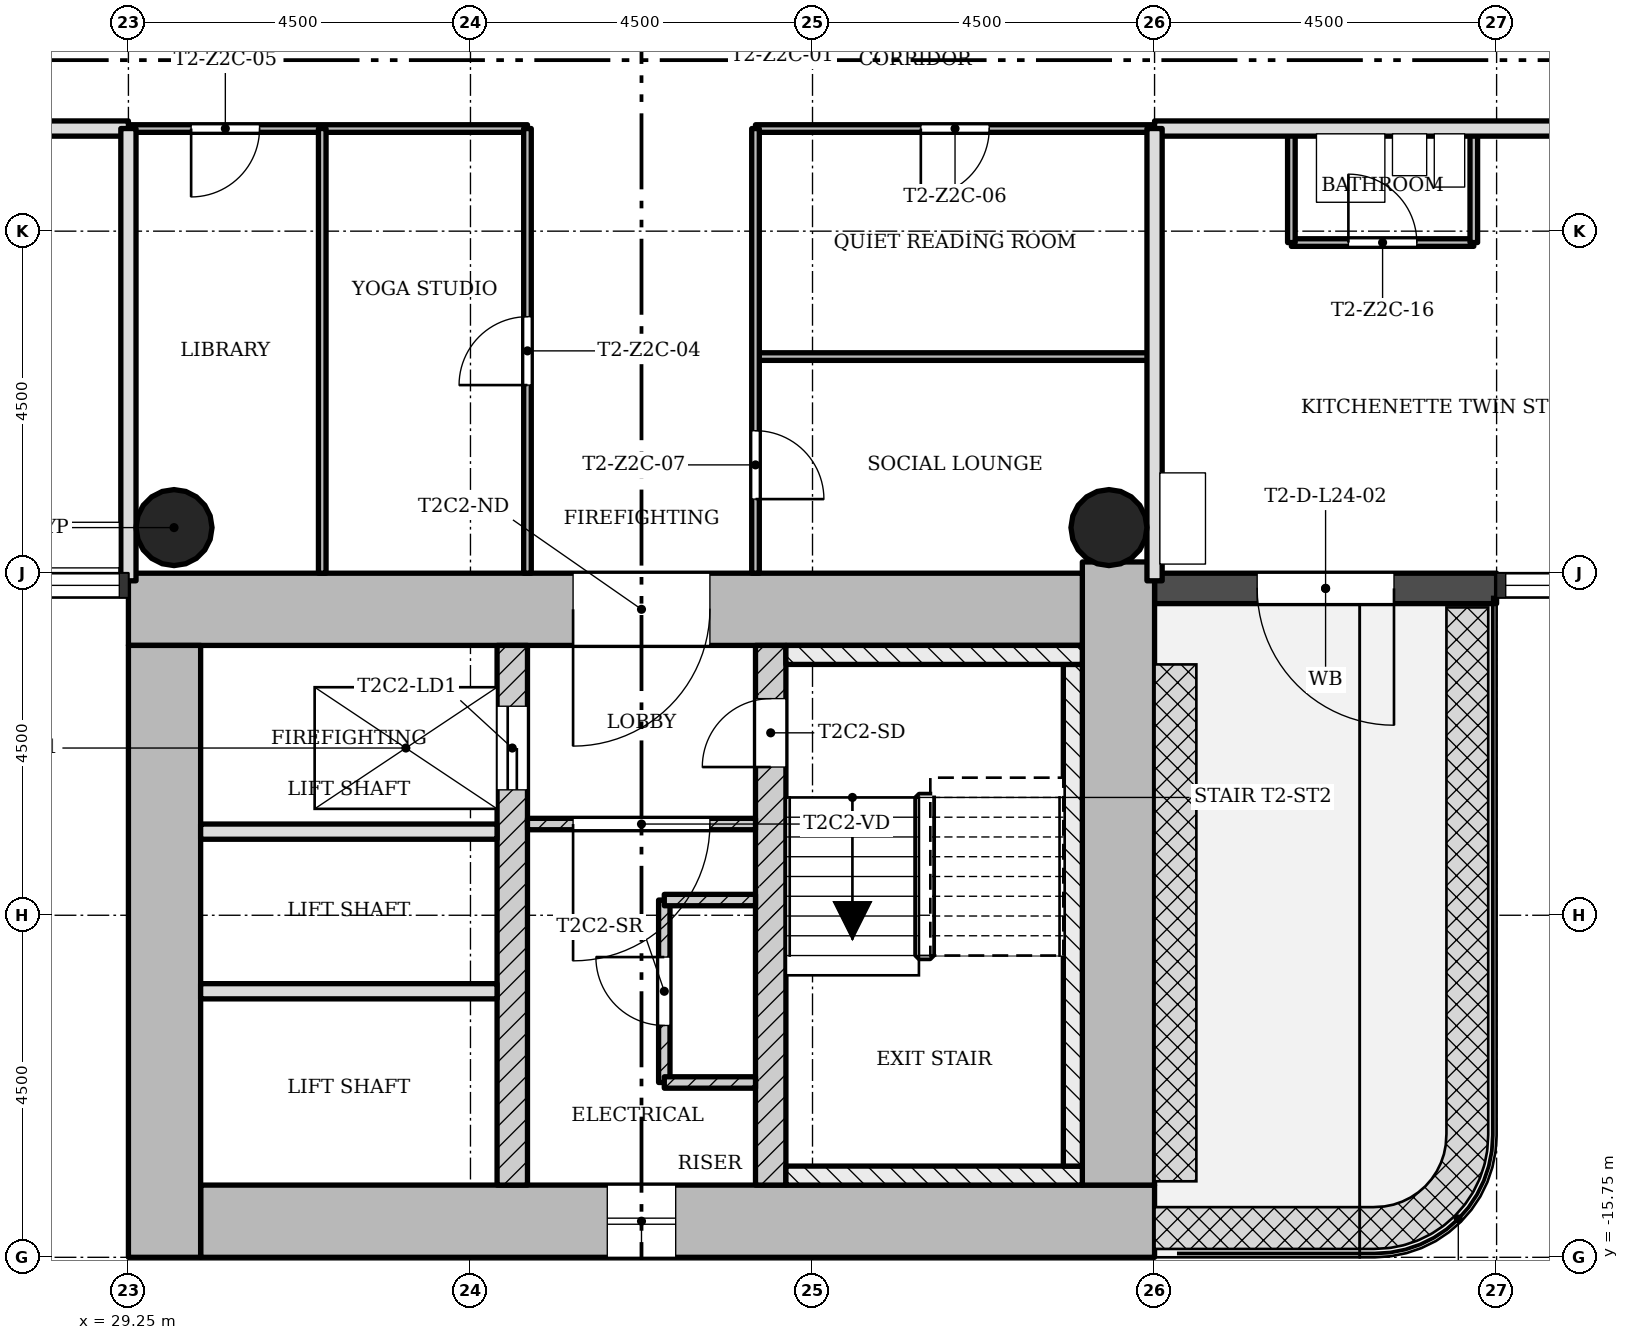
"""IFC4 building model, lengths in metres.
Left out: names, types, materials, properties, quantities, classifications, styles, units other than length and angle.
Written with IfcOpenShell. Run it as: python <this file> out.ifc"""

import sys

from ifc_helpers import new_model, si_unit, direction, frame, frame_2d, origin, origin_2d, place, context, subcontext, project, spatial, rectangle, hollow_circle, extrude, element, fill, save


model = new_model("IFC4")
c1 = context("Model", 3, precision=1e-05, world=origin(), true_north=direction((0.0, 1.0)))
c2 = subcontext(c1, "Body", "Model", "MODEL_VIEW")
j1 = project(units=[si_unit("LENGTHUNIT", "METRE"), si_unit("PLANEANGLEUNIT", "RADIAN")], contexts=[c1])
p1 = place(None, origin())
s1 = spatial("IfcSite", under=j1, at=p1, CompositionType="ELEMENT")
p2 = place(p1, origin())
s2 = spatial("IfcBuilding", under=s1, at=p2, CompositionType="ELEMENT")
p3 = place(p2, frame((0.0, 0.0, 90.2)))
s3 = spatial("IfcBuildingStorey", under=s2, at=p3, CompositionType="ELEMENT", Elevation=90.2)
p4 = place(p3, frame((30.2, -15.275, 0.0), z_axis=(0.0, 0.0, 1.0), x_axis=(1.0, 0.0, 0.0)))
e1 = element("IfcWall", 1, at=p4, inside=s3, PredefinedType="SHEAR", context=c2, shape_type="SweptSolid", body=[
    extrude(rectangle(XDim=12.55, YDim=0.95, at=frame_2d((6.275, 0.0))), origin(), (0.0, 0.0, 1.0), 3.4),
])
p5 = place(p4, frame((5.35, 0.0, 0.45)))
e2 = element("IfcOpeningElement", 2, at=p5, cuts=e1, PredefinedType="OPENING", context=c2, shape_type="SweptSolid", body=[
    extrude(rectangle(XDim=0.9, YDim=2.4, at=frame_2d((0.45, 1.2))), frame((0.0, 0.485, 0.0), z_axis=(0.0, -1.0, 0.0), x_axis=(1.0, 0.0, 0.0)), (0.0, 0.0, 1.0), 0.97),
])
p6 = place(p3, frame((42.275, -14.8, 0.0), z_axis=(0.0, 0.0, 1.0), x_axis=(0.0, 1.0, 0.0)))
e3 = element("IfcWall", 3, at=p6, inside=s3, PredefinedType="SHEAR", context=c2, shape_type="SweptSolid", body=[
    extrude(rectangle(XDim=8.198, YDim=0.95, at=frame_2d((4.099, 0.0))), origin(), (0.0, 0.0, 1.0), 3.4),
])
p7 = place(p3, frame((41.8, -7.225, 0.0), z_axis=(0.0, 0.0, 1.0), x_axis=(-1.0, 0.0, 0.0)))
e4 = element("IfcWall", 4, at=p7, inside=s3, PredefinedType="SHEAR", context=c2, shape_type="SweptSolid", body=[
    extrude(rectangle(XDim=12.55, YDim=0.95, at=frame_2d((6.275, 0.0))), origin(), (0.0, 0.0, 1.0), 3.4),
])
p8 = place(p7, frame((4.9, 0.0, 0.0)))
e5 = element("IfcOpeningElement", 5, at=p8, cuts=e4, PredefinedType="OPENING", context=c2, shape_type="SweptSolid", body=[
    extrude(rectangle(XDim=1.8, YDim=2.1, at=frame_2d((0.9, 1.05))), frame((0.0, 0.485, 0.0), z_axis=(0.0, -1.0, 0.0), x_axis=(1.0, 0.0, 0.0)), (0.0, 0.0, 1.0), 0.97),
])
p9 = place(p3, frame((29.725, -7.7, 0.0), z_axis=(0.0, 0.0, 1.0), x_axis=(0.0, -1.0, 0.0)))
e6 = element("IfcWall", 6, at=p9, inside=s3, PredefinedType="SHEAR", context=c2, shape_type="SweptSolid", body=[
    extrude(rectangle(XDim=8.05, YDim=0.95, at=frame_2d((4.025, 0.0))), origin(), (0.0, 0.0, 1.0), 3.4),
])
p10 = place(p3, frame((34.3, -14.8, 0.0), z_axis=(0.0, 0.0, 1.0), x_axis=(0.0, 1.0, 0.0)))
e7 = element("IfcWall", 7, at=p10, inside=s3, PredefinedType="SHEAR", context=c2, shape_type="SweptSolid", body=[
    extrude(rectangle(XDim=7.1, YDim=0.4, at=frame_2d((3.55, 0.0))), origin(), (0.0, 0.0, 1.0), 3.4),
])
p11 = place(p10, frame((5.2, 0.0, 0.0)))
e8 = element("IfcOpeningElement", 8, at=p11, cuts=e7, PredefinedType="OPENING", context=c2, shape_type="SweptSolid", body=[
    extrude(rectangle(XDim=1.1, YDim=2.1, at=frame_2d((0.55, 1.05))), frame((0.0, 0.21, 0.0), z_axis=(0.0, -1.0, 0.0), x_axis=(1.0, 0.0, 0.0)), (0.0, 0.0, 1.0), 0.42),
])
p12 = place(p3, frame((37.7, -14.8, 0.0), z_axis=(0.0, 0.0, 1.0), x_axis=(0.0, 1.0, 0.0)))
e9 = element("IfcWall", 9, at=p12, inside=s3, PredefinedType="SHEAR", context=c2, shape_type="SweptSolid", body=[
    extrude(rectangle(XDim=7.1, YDim=0.4, at=frame_2d((3.55, 0.0))), origin(), (0.0, 0.0, 1.0), 3.4),
])
p13 = place(p12, frame((5.5, 0.0, 0.0)))
e10 = element("IfcOpeningElement", 10, at=p13, cuts=e9, PredefinedType="OPENING", context=c2, shape_type="SweptSolid", body=[
    extrude(rectangle(XDim=0.9, YDim=2.1, at=frame_2d((0.45, 1.05))), frame((0.0, 0.21, 0.0), z_axis=(0.0, -1.0, 0.0), x_axis=(1.0, 0.0, 0.0)), (0.0, 0.0, 1.0), 0.42),
])
for number, where, z_axis, x_axis in (
    (11, (42.15, -6.15, 0.0), (0.0, 0.0, 1.0), (1.0, 0.0, 0.0)),
    (12, (29.85, -6.15, 0.0), (0.0, 0.0, 1.0), (1.0, 0.0, 0.0)),
):
    element("IfcColumn", number, at=place(p3, frame(where, z_axis=z_axis, x_axis=x_axis)), inside=s3, PredefinedType="COLUMN", context=c2, shape_type="SweptSolid", body=[
        extrude(hollow_circle(Radius=0.5, WallThickness=0.036, at=origin_2d()), origin(), (0.0, 0.0, 1.0), 3.4),
    ])
p14 = place(p3, frame((42.75, -6.95, -0.02), z_axis=(0.0, 0.0, 1.0), x_axis=(1.0, 0.0, 0.0)))
e13 = element("IfcWall", 13, at=p14, inside=s3, PredefinedType="STANDARD", context=c2, shape_type="SweptSolid", body=[
    extrude(rectangle(XDim=4.5, YDim=0.4, at=frame_2d((2.25, 0.0))), origin(), (0.0, 0.0, 1.0), 3.12),
])
p15 = place(p14, frame((1.35, 0.0, 0.02)))
e14 = element("IfcOpeningElement", 14, at=p15, cuts=e13, PredefinedType="OPENING", context=c2, shape_type="SweptSolid", body=[
    extrude(rectangle(XDim=1.8, YDim=2.1, at=frame_2d((0.9, 1.05))), frame((0.0, 0.21, 0.0), z_axis=(0.0, -1.0, 0.0), x_axis=(1.0, 0.0, 0.0)), (0.0, 0.0, 1.0), 0.42),
])
p16 = place(p3, frame((34.5, -10.05, 0.0), z_axis=(0.0, 0.0, 1.0), x_axis=(1.0, 0.0, 0.0)))
e15 = element("IfcWall", 15, at=p16, inside=s3, PredefinedType="PARTITIONING", context=c2, shape_type="SweptSolid", body=[
    extrude(rectangle(XDim=3.0, YDim=0.15, at=frame_2d((1.5, 0.0))), origin(), (0.0, 0.0, 1.0), 3.0),
])
p17 = place(p16, frame((0.6, 0.0, 0.0)))
e16 = element("IfcOpeningElement", 16, at=p17, cuts=e15, PredefinedType="OPENING", context=c2, shape_type="SweptSolid", body=[
    extrude(rectangle(XDim=1.8, YDim=2.1, at=frame_2d((0.9, 1.05))), frame((0.0, 0.085, 0.0), z_axis=(0.0, -1.0, 0.0), x_axis=(1.0, 0.0, 0.0)), (0.0, 0.0, 1.0), 0.17),
])
for number, where, z_axis, x_axis in (
    (17, (30.2, -10.15, 0.0), (0.0, 0.0, 1.0), (1.0, 0.0, 0.0)),
    (18, (30.2, -12.25, 0.0), (0.0, 0.0, 1.0), (1.0, 0.0, 0.0)),
):
    element("IfcWall", number, at=place(p3, frame(where, z_axis=z_axis, x_axis=x_axis)), inside=s3, PredefinedType="SOLIDWALL", context=c2, shape_type="SweptSolid", body=[
        extrude(rectangle(XDim=3.9, YDim=0.2, at=frame_2d((1.95, 0.0))), origin(), (0.0, 0.0, 1.0), 3.0),
    ])
p18 = place(p3, frame((36.3, -11.05, 0.0), z_axis=(0.0, 0.0, 1.0), x_axis=(0.0, -1.0, 0.0)))
e19 = element("IfcWall", 19, at=p18, inside=s3, PredefinedType="PARTITIONING", context=c2, shape_type="SweptSolid", body=[
    extrude(rectangle(XDim=2.4, YDim=0.15, at=frame_2d((1.2, 0.0))), origin(), (0.0, 0.0, 1.0), 3.0),
])
p19 = place(p18, frame((0.75, 0.0, 0.0)))
e20 = element("IfcOpeningElement", 20, at=p19, cuts=e19, PredefinedType="OPENING", context=c2, shape_type="SweptSolid", body=[
    extrude(rectangle(XDim=0.9, YDim=2.1, at=frame_2d((0.45, 1.05))), frame((0.0, 0.085, 0.0), z_axis=(0.0, -1.0, 0.0), x_axis=(1.0, 0.0, 0.0)), (0.0, 0.0, 1.0), 0.17),
])
for number, where, z_axis, x_axis in (
    (21, (36.3, -11.05, 0.0), (0.0, 0.0, 1.0), (1.0, 0.0, 0.0)),
    (22, (36.3, -13.45, 0.0), (0.0, 0.0, 1.0), (1.0, 0.0, 0.0)),
):
    element("IfcWall", number, at=place(p3, frame(where, z_axis=z_axis, x_axis=x_axis)), inside=s3, PredefinedType="PARTITIONING", context=c2, shape_type="SweptSolid", body=[
        extrude(rectangle(XDim=1.2, YDim=0.15, at=frame_2d((0.6, 0.0))), origin(), (0.0, 0.0, 1.0), 3.0),
    ])
p20 = place(p3, frame((42.75, -3.9, 0.0), z_axis=(0.0, 0.0, 1.0), x_axis=(-1.0, 0.0, 0.0)))
e23 = element("IfcWall", 23, at=p20, inside=s3, PredefinedType="PARTITIONING", context=c2, shape_type="SweptSolid", body=[
    extrude(rectangle(XDim=5.25, YDim=0.1, at=frame_2d((2.625, 0.0))), origin(), (0.0, 0.0, 1.0), 3.0),
])
p21 = place(p3, frame((46.95, -2.4, 0.0), z_axis=(0.0, 0.0, 1.0), x_axis=(-1.0, 0.0, 0.0)))
e24 = element("IfcWall", 24, at=p21, inside=s3, PredefinedType="PARTITIONING", context=c2, shape_type="SweptSolid", body=[
    extrude(rectangle(XDim=2.4, YDim=0.1, at=frame_2d((1.2, 0.0))), origin(), (0.0, 0.0, 1.0), 3.0),
])
p22 = place(p21, frame((0.75, 0.0, 0.0)))
e25 = element("IfcOpeningElement", 25, at=p22, cuts=e24, PredefinedType="OPENING", context=c2, shape_type="SweptSolid", body=[
    extrude(rectangle(XDim=0.9, YDim=2.1, at=frame_2d((0.45, 1.05))), frame((0.0, 0.06, 0.0), z_axis=(0.0, -1.0, 0.0), x_axis=(1.0, 0.0, 0.0)), (0.0, 0.0, 1.0), 0.12),
])
p23 = place(p3, frame((42.75, -0.9, 0.0), z_axis=(0.0, 0.0, 1.0), x_axis=(-1.0, 0.0, 0.0)))
e26 = element("IfcWall", 26, at=p23, inside=s3, PredefinedType="PARTITIONING", context=c2, shape_type="SweptSolid", body=[
    extrude(rectangle(XDim=5.25, YDim=0.1, at=frame_2d((2.625, 0.0))), origin(), (0.0, 0.0, 1.0), 3.0),
])
p24 = place(p23, frame((2.175, 0.0, 0.0)))
e27 = element("IfcOpeningElement", 27, at=p24, cuts=e26, PredefinedType="OPENING", context=c2, shape_type="SweptSolid", body=[
    extrude(rectangle(XDim=0.9, YDim=2.1, at=frame_2d((0.45, 1.05))), frame((0.0, 0.06, 0.0), z_axis=(0.0, -1.0, 0.0), x_axis=(1.0, 0.0, 0.0)), (0.0, 0.0, 1.0), 0.12),
])
p25 = place(p3, frame((34.5, -0.9, 0.0), z_axis=(0.0, 0.0, 1.0), x_axis=(-1.0, 0.0, 0.0)))
e28 = element("IfcWall", 28, at=p25, inside=s3, PredefinedType="PARTITIONING", context=c2, shape_type="SweptSolid", body=[
    extrude(rectangle(XDim=5.25, YDim=0.1, at=frame_2d((2.625, 0.0))), origin(), (0.0, 0.0, 1.0), 3.0),
])
p26 = place(p25, frame((3.525, 0.0, 0.0)))
e29 = element("IfcOpeningElement", 29, at=p26, cuts=e28, PredefinedType="OPENING", context=c2, shape_type="SweptSolid", body=[
    extrude(rectangle(XDim=0.9, YDim=2.1, at=frame_2d((0.45, 1.05))), frame((0.0, 0.06, 0.0), z_axis=(0.0, -1.0, 0.0), x_axis=(1.0, 0.0, 0.0)), (0.0, 0.0, 1.0), 0.12),
])
p27 = place(p3, frame((51.75, -0.9, 0.0), z_axis=(0.0, 0.0, 1.0), x_axis=(-1.0, 0.0, 0.0)))
e30 = element("IfcWall", 30, at=p27, inside=s3, PredefinedType="SOLIDWALL", context=c2, shape_type="SweptSolid", body=[
    extrude(rectangle(XDim=9.0, YDim=0.2, at=frame_2d((4.5, 0.0))), origin(), (0.0, 0.0, 1.0), 3.0),
])
p28 = place(p27, frame((1.95, 0.0, 0.0)))
e31 = element("IfcOpeningElement", 31, at=p28, cuts=e30, PredefinedType="OPENING", context=c2, shape_type="SweptSolid", body=[
    extrude(rectangle(XDim=0.9, YDim=2.1, at=frame_2d((0.45, 1.05))), frame((0.0, 0.11, 0.0), z_axis=(0.0, -1.0, 0.0), x_axis=(1.0, 0.0, 0.0)), (0.0, 0.0, 1.0), 0.22),
])
p29 = place(p3, frame((29.25, -0.9, 0.0), z_axis=(0.0, 0.0, 1.0), x_axis=(-1.0, 0.0, 0.0)))
e32 = element("IfcWall", 32, at=p29, inside=s3, PredefinedType="SOLIDWALL", context=c2, shape_type="SweptSolid", body=[
    extrude(rectangle(XDim=1.8, YDim=0.2, at=frame_2d((0.9, 0.0))), origin(), (0.0, 0.0, 1.0), 3.0),
])
for number, where, z_axis, x_axis in (
    (33, (46.95, -2.4, 0.0), (0.0, 0.0, 1.0), (0.0, 1.0, 0.0)),
    (34, (44.55, -2.4, 0.0), (0.0, 0.0, 1.0), (0.0, 1.0, 0.0)),
):
    element("IfcWall", number, at=place(p3, frame(where, z_axis=z_axis, x_axis=x_axis)), inside=s3, PredefinedType="PARTITIONING", context=c2, shape_type="SweptSolid", body=[
        extrude(rectangle(XDim=1.5, YDim=0.1, at=frame_2d((0.75, 0.0))), origin(), (0.0, 0.0, 1.0), 3.0),
    ])
p30 = place(p3, frame((42.75, -6.85, 0.0), z_axis=(0.0, 0.0, 1.0), x_axis=(0.0, 1.0, 0.0)))
e35 = element("IfcWall", 35, at=p30, inside=s3, PredefinedType="SOLIDWALL", context=c2, shape_type="SweptSolid", body=[
    extrude(rectangle(XDim=5.95, YDim=0.2, at=frame_2d((2.975, 0.0))), origin(), (0.0, 0.0, 1.0), 3.0),
])
p31 = place(p3, frame((37.5, -6.75, 0.0), z_axis=(0.0, 0.0, 1.0), x_axis=(0.0, 1.0, 0.0)))
e36 = element("IfcWall", 36, at=p31, inside=s3, PredefinedType="PARTITIONING", context=c2, shape_type="SweptSolid", body=[
    extrude(rectangle(XDim=5.85, YDim=0.1, at=frame_2d((2.925, 0.0))), origin(), (0.0, 0.0, 1.0), 3.0),
])
p32 = place(p31, frame((0.975, 0.0, 0.0)))
e37 = element("IfcOpeningElement", 37, at=p32, cuts=e36, PredefinedType="OPENING", context=c2, shape_type="SweptSolid", body=[
    extrude(rectangle(XDim=0.9, YDim=2.1, at=frame_2d((0.45, 1.05))), frame((0.0, 0.06, 0.0), z_axis=(0.0, -1.0, 0.0), x_axis=(1.0, 0.0, 0.0)), (0.0, 0.0, 1.0), 0.12),
])
p33 = place(p3, frame((34.5, -6.75, 0.0), z_axis=(0.0, 0.0, 1.0), x_axis=(0.0, 1.0, 0.0)))
e38 = element("IfcWall", 38, at=p33, inside=s3, PredefinedType="PARTITIONING", context=c2, shape_type="SweptSolid", body=[
    extrude(rectangle(XDim=5.85, YDim=0.1, at=frame_2d((2.925, 0.0))), origin(), (0.0, 0.0, 1.0), 3.0),
])
p34 = place(p33, frame((2.475, 0.0, 0.0)))
e39 = element("IfcOpeningElement", 39, at=p34, cuts=e38, PredefinedType="OPENING", context=c2, shape_type="SweptSolid", body=[
    extrude(rectangle(XDim=0.9, YDim=2.1, at=frame_2d((0.45, 1.05))), frame((0.0, 0.06, 0.0), z_axis=(0.0, -1.0, 0.0), x_axis=(1.0, 0.0, 0.0)), (0.0, 0.0, 1.0), 0.12),
])
p35 = place(p3, frame((31.8, -6.75, 0.0), z_axis=(0.0, 0.0, 1.0), x_axis=(0.0, 1.0, 0.0)))
e40 = element("IfcWall", 40, at=p35, inside=s3, PredefinedType="PARTITIONING", context=c2, shape_type="SweptSolid", body=[
    extrude(rectangle(XDim=5.85, YDim=0.1, at=frame_2d((2.925, 0.0))), origin(), (0.0, 0.0, 1.0), 3.0),
])
p36 = place(p3, frame((29.25, -6.85, 0.0), z_axis=(0.0, 0.0, 1.0), x_axis=(0.0, 1.0, 0.0)))
e41 = element("IfcWall", 41, at=p36, inside=s3, PredefinedType="SOLIDWALL", context=c2, shape_type="SweptSolid", body=[
    extrude(rectangle(XDim=5.95, YDim=0.2, at=frame_2d((2.975, 0.0))), origin(), (0.0, 0.0, 1.0), 3.0),
])
p37 = place(p3, frame((37.9, -14.675, 0.0), z_axis=(0.0, 0.0, 1.0), x_axis=(1.0, 0.0, 0.0)))
e42 = element("IfcWall", 42, at=p37, inside=s3, PredefinedType="SHEAR", context=c2, shape_type="SweptSolid", body=[
    extrude(rectangle(XDim=3.9, YDim=0.25, at=frame_2d((1.95, 0.0))), origin(), (0.0, 0.0, 1.0), 3.4),
])
p38 = place(p3, frame((41.675, -7.95, 0.0), z_axis=(0.0, 0.0, 1.0), x_axis=(0.0, -1.0, 0.0)))
e43 = element("IfcWall", 43, at=p38, inside=s3, PredefinedType="SHEAR", context=c2, shape_type="SweptSolid", body=[
    extrude(rectangle(XDim=6.6, YDim=0.25, at=frame_2d((3.3, 0.0))), origin(), (0.0, 0.0, 1.0), 3.4),
])
p39 = place(p3, frame((37.9, -7.825, 0.0), z_axis=(0.0, 0.0, 1.0), x_axis=(1.0, 0.0, 0.0)))
e44 = element("IfcWall", 44, at=p39, inside=s3, PredefinedType="SHEAR", context=c2, shape_type="SweptSolid", body=[
    extrude(rectangle(XDim=3.9, YDim=0.25, at=frame_2d((1.95, 0.0))), origin(), (0.0, 0.0, 1.0), 3.4),
])
p40 = place(p15, origin())
e45 = element("IfcDoor", 45, at=p40, inside=s3, OperationType="SINGLE_SWING_RIGHT", PredefinedType="DOOR", context=c2, shape_type="SweptSolid", body=[
    extrude(rectangle(XDim=1.8, YDim=2.1, at=frame_2d((0.9, 1.05))), frame((0.0, 0.025, 0.0), z_axis=(0.0, -1.0, 0.0), x_axis=(1.0, 0.0, 0.0)), (0.0, 0.0, 1.0), 0.05),
])
fill(e14, e45)
p41 = place(p5, origin())
e46 = element("IfcWindow", 46, at=p41, inside=s3, PartitioningType="SINGLE_PANEL", PredefinedType="WINDOW", context=c2, shape_type="SweptSolid", body=[
    extrude(rectangle(XDim=0.9, YDim=2.4, at=frame_2d((0.45, 1.2))), frame((0.0, 0.03, 0.0), z_axis=(0.0, -1.0, 0.0), x_axis=(1.0, 0.0, 0.0)), (0.0, 0.0, 1.0), 0.06),
])
fill(e2, e46)
p42 = place(p17, origin())
e47 = element("IfcDoor", 47, at=p42, inside=s3, OperationType="SINGLE_SWING_LEFT", PredefinedType="DOOR", context=c2, shape_type="SweptSolid", body=[
    extrude(rectangle(XDim=1.8, YDim=2.1, at=frame_2d((0.9, 1.05))), frame((0.0, 0.025, 0.0), z_axis=(0.0, -1.0, 0.0), x_axis=(1.0, 0.0, 0.0)), (0.0, 0.0, 1.0), 0.05),
])
fill(e16, e47)
p43 = place(p19, origin())
e48 = element("IfcDoor", 48, at=p43, inside=s3, OperationType="SINGLE_SWING_LEFT", PredefinedType="DOOR", context=c2, shape_type="SweptSolid", body=[
    extrude(rectangle(XDim=0.9, YDim=2.1, at=frame_2d((0.45, 1.05))), frame((0.0, 0.025, 0.0), z_axis=(0.0, -1.0, 0.0), x_axis=(1.0, 0.0, 0.0)), (0.0, 0.0, 1.0), 0.05),
])
fill(e20, e48)
p44 = place(p34, origin())
e49 = element("IfcDoor", 49, at=p44, inside=s3, OperationType="SINGLE_SWING_RIGHT", PredefinedType="DOOR", context=c2, shape_type="SweptSolid", body=[
    extrude(rectangle(XDim=0.9, YDim=2.1, at=frame_2d((0.45, 1.05))), frame((0.0, 0.025, 0.0), z_axis=(0.0, -1.0, 0.0), x_axis=(1.0, 0.0, 0.0)), (0.0, 0.0, 1.0), 0.05),
])
fill(e39, e49)
p45 = place(p26, origin())
e50 = element("IfcDoor", 50, at=p45, inside=s3, OperationType="SINGLE_SWING_LEFT", PredefinedType="DOOR", context=c2, shape_type="SweptSolid", body=[
    extrude(rectangle(XDim=0.9, YDim=2.1, at=frame_2d((0.45, 1.05))), frame((0.0, 0.025, 0.0), z_axis=(0.0, -1.0, 0.0), x_axis=(1.0, 0.0, 0.0)), (0.0, 0.0, 1.0), 0.05),
])
fill(e29, e50)
p46 = place(p24, origin())
e51 = element("IfcDoor", 51, at=p46, inside=s3, OperationType="SINGLE_SWING_LEFT", PredefinedType="DOOR", context=c2, shape_type="SweptSolid", body=[
    extrude(rectangle(XDim=0.9, YDim=2.1, at=frame_2d((0.45, 1.05))), frame((0.0, 0.025, 0.0), z_axis=(0.0, -1.0, 0.0), x_axis=(1.0, 0.0, 0.0)), (0.0, 0.0, 1.0), 0.05),
])
fill(e27, e51)
p47 = place(p32, origin())
e52 = element("IfcDoor", 52, at=p47, inside=s3, OperationType="SINGLE_SWING_LEFT", PredefinedType="DOOR", context=c2, shape_type="SweptSolid", body=[
    extrude(rectangle(XDim=0.9, YDim=2.1, at=frame_2d((0.45, 1.05))), frame((0.0, 0.025, 0.0), z_axis=(0.0, -1.0, 0.0), x_axis=(1.0, 0.0, 0.0)), (0.0, 0.0, 1.0), 0.05),
])
fill(e37, e52)
p48 = place(p22, origin())
e53 = element("IfcDoor", 53, at=p48, inside=s3, OperationType="SINGLE_SWING_RIGHT", PredefinedType="DOOR", context=c2, shape_type="SweptSolid", body=[
    extrude(rectangle(XDim=0.9, YDim=2.1, at=frame_2d((0.45, 1.05))), frame((0.0, 0.025, 0.0), z_axis=(0.0, -1.0, 0.0), x_axis=(1.0, 0.0, 0.0)), (0.0, 0.0, 1.0), 0.05),
])
fill(e25, e53)
p49 = place(p13, origin())
e54 = element("IfcDoor", 54, at=p49, inside=s3, OperationType="SINGLE_SWING_RIGHT", PredefinedType="DOOR", context=c2, shape_type="SweptSolid", body=[
    extrude(rectangle(XDim=0.9, YDim=2.1, at=frame_2d((0.45, 1.05))), frame((0.0, 0.025, 0.0), z_axis=(0.0, -1.0, 0.0), x_axis=(1.0, 0.0, 0.0)), (0.0, 0.0, 1.0), 0.05),
])
fill(e10, e54)
p50 = place(p11, origin())
e55 = element("IfcDoor", 55, at=p50, inside=s3, OperationType="SLIDING_TO_LEFT", PredefinedType="DOOR", context=c2, shape_type="SweptSolid", body=[
    extrude(rectangle(XDim=1.1, YDim=2.1, at=frame_2d((0.55, 1.05))), frame((0.0, 0.025, 0.0), z_axis=(0.0, -1.0, 0.0), x_axis=(1.0, 0.0, 0.0)), (0.0, 0.0, 1.0), 0.05),
])
fill(e8, e55)
p51 = place(p8, origin())
e56 = element("IfcDoor", 56, at=p51, inside=s3, OperationType="SINGLE_SWING_LEFT", PredefinedType="DOOR", context=c2, shape_type="SweptSolid", body=[
    extrude(rectangle(XDim=1.8, YDim=2.1, at=frame_2d((0.9, 1.05))), frame((0.0, 0.025, 0.0), z_axis=(0.0, -1.0, 0.0), x_axis=(1.0, 0.0, 0.0)), (0.0, 0.0, 1.0), 0.05),
])
fill(e5, e56)
save(model, sys.argv[1])
